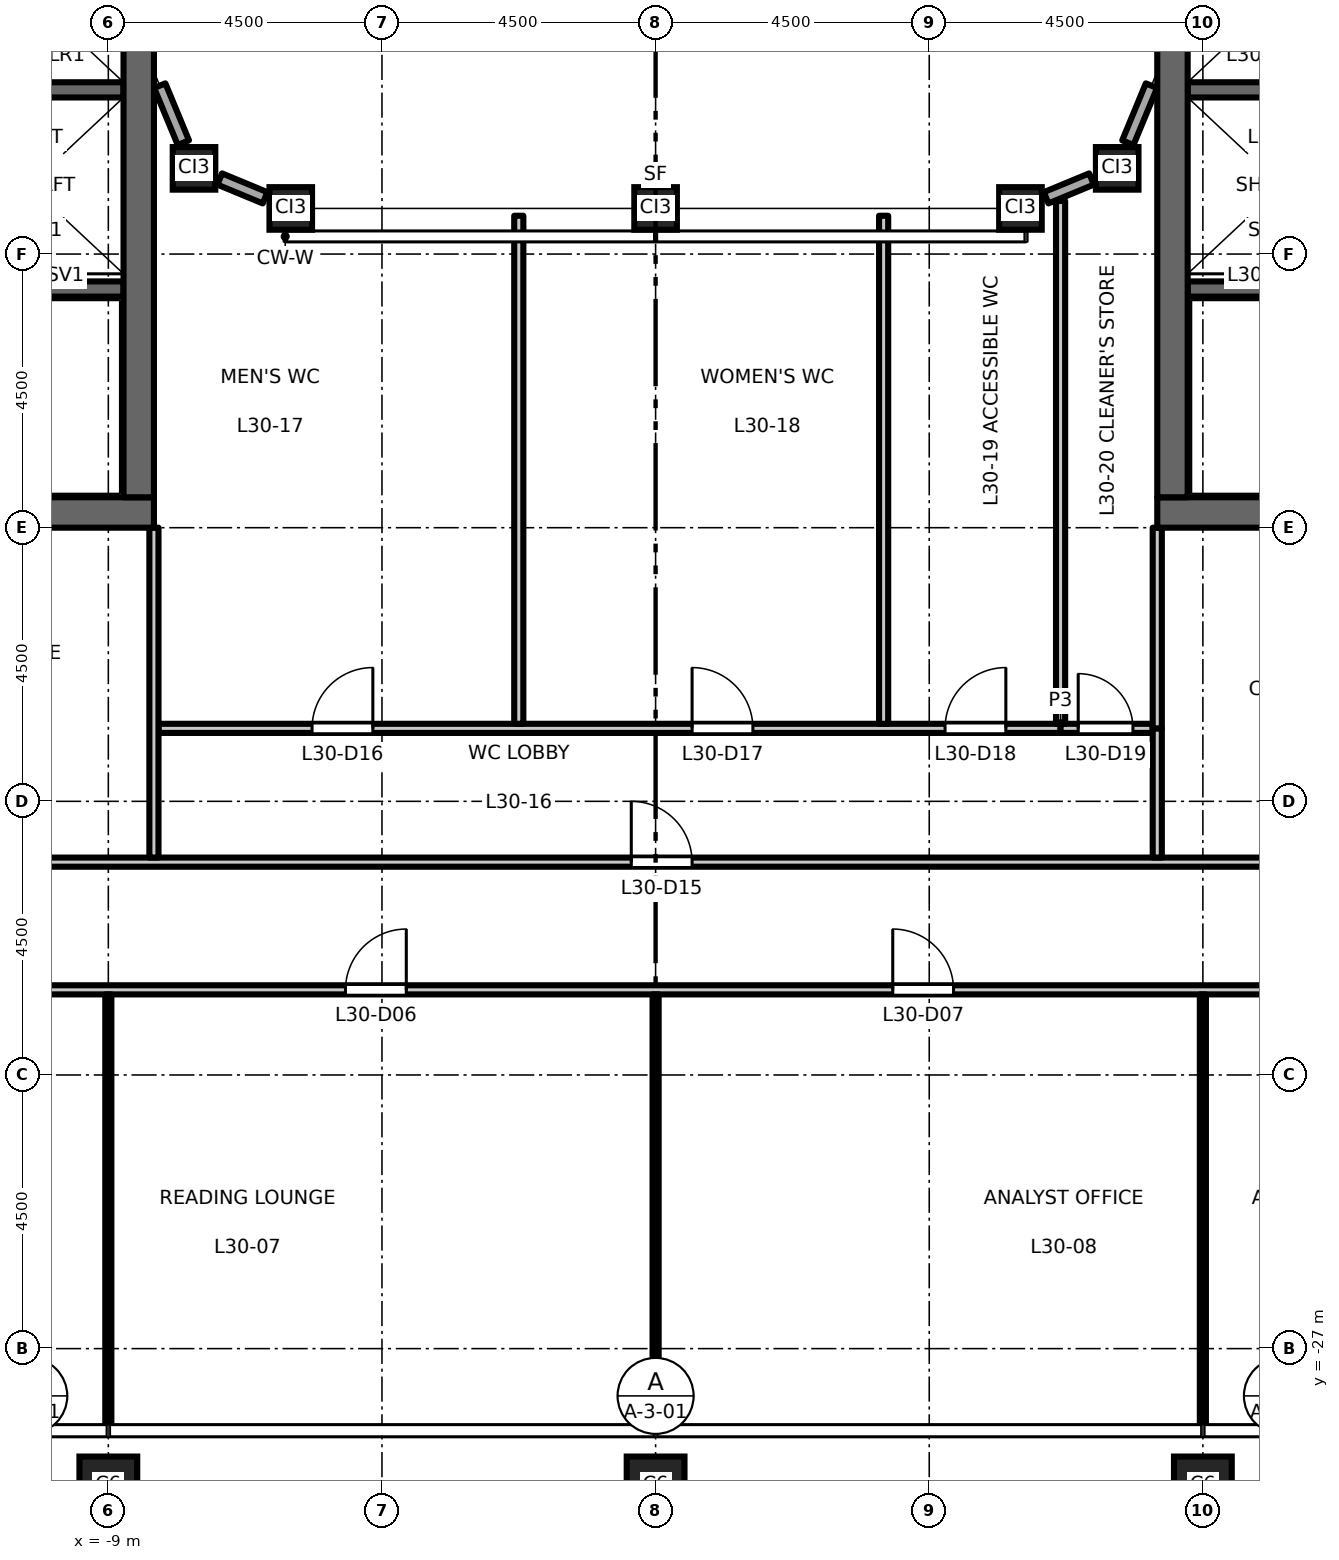
"""IFC4 building model, lengths in metres.
Left out: names, types, materials, properties, quantities, classifications, styles, units other than length and angle.
Written with IfcOpenShell. Run it as: python <this file> out.ifc"""

import sys

from ifc_helpers import new_model, si_unit, direction, frame, frame_2d, origin, origin_2d, place, context, subcontext, project, spatial, rectangle, hollow_rectangle, extrude, element, fill, save


model = new_model("IFC4")
c1 = context("Model", 3, precision=1e-05, world=origin(), true_north=direction((0.0, 1.0)))
c2 = subcontext(c1, "Body", "Model", "MODEL_VIEW")
j1 = project(units=[si_unit("LENGTHUNIT", "METRE"), si_unit("PLANEANGLEUNIT", "RADIAN")], contexts=[c1])
p1 = place(None, origin())
s1 = spatial("IfcSite", under=j1, at=p1, CompositionType="ELEMENT")
p2 = place(p1, origin())
s2 = spatial("IfcBuilding", under=s1, at=p2, CompositionType="ELEMENT")
p3 = place(p2, frame((0.0, 0.0, 140.7)))
s3 = spatial("IfcBuildingStorey", under=s2, at=p3, CompositionType="ELEMENT", Elevation=140.7)
for number, where, z_axis, x_axis in (
    (1, (-9.0, -29.25, 0.0), (0.0, 0.0, 1.0), (1.0, 0.0, 0.0)),
    (2, (0.0, -29.25, 0.0), (0.0, 0.0, 1.0), (1.0, 0.0, 0.0)),
    (3, (9.0, -29.25, 0.0), (0.0, 0.0, 1.0), (1.0, 0.0, 0.0)),
):
    element("IfcColumn", number, at=place(p3, frame(where, z_axis=z_axis, x_axis=x_axis)), inside=s3, PredefinedType="COLUMN", context=c2, shape_type="SweptSolid", body=[
        extrude(hollow_rectangle(XDim=0.95, YDim=0.95, WallThickness=0.055, at=origin_2d()), origin(), (0.0, 0.0, 1.0), 4.5),
    ])
for number, where, z_axis, x_axis in (
    (4, (-7.591, -7.591, 0.0), (0.0, 0.0, 1.0), (1.0, 0.0, 0.0)),
    (5, (-6.0, -8.25, 0.0), (0.0, 0.0, 1.0), (1.0, 0.0, 0.0)),
    (6, (0.0, -8.25, 0.0), (0.0, 0.0, 1.0), (1.0, 0.0, 0.0)),
    (7, (6.0, -8.25, 0.0), (0.0, 0.0, 1.0), (1.0, 0.0, 0.0)),
    (8, (7.591, -7.591, 0.0), (0.0, 0.0, 1.0), (1.0, 0.0, 0.0)),
):
    element("IfcColumn", number, at=place(p3, frame(where, z_axis=z_axis, x_axis=x_axis)), inside=s3, PredefinedType="COLUMN", context=c2, shape_type="SweptSolid", body=[
        extrude(hollow_rectangle(XDim=0.7, YDim=0.7, WallThickness=0.04, at=origin_2d()), origin(), (0.0, 0.0, 1.0), 4.5),
    ])
p4 = place(p3, frame((-8.75, -6.3, 0.0), z_axis=(0.0, 0.0, 1.0), x_axis=(-1.0, 0.0, 0.0)))
e9 = element("IfcWall", 9, at=p4, inside=s3, PredefinedType="SHEAR", context=c2, shape_type="SweptSolid", body=[
    extrude(rectangle(XDim=3.1, YDim=0.25, at=frame_2d((1.55, 0.0))), origin(), (0.0, 0.0, 1.0), 4.35),
])
p5 = place(p3, frame((-8.75, -9.575, 0.0), z_axis=(0.0, 0.0, 1.0), x_axis=(-1.0, 0.0, 0.0)))
e10 = element("IfcWall", 10, at=p5, inside=s3, PredefinedType="SHEAR", context=c2, shape_type="SweptSolid", body=[
    extrude(rectangle(XDim=8.0, YDim=0.25, at=frame_2d((4.0, 0.0))), origin(), (0.0, 0.0, 1.0), 4.35),
])
p6 = place(p5, frame((6.65, 0.0, 0.0)))
e11 = element("IfcOpeningElement", 11, at=p6, cuts=e10, PredefinedType="OPENING", context=c2, shape_type="SweptSolid", body=[
    extrude(rectangle(XDim=1.1, YDim=2.1, at=frame_2d((0.55, 1.05))), frame((0.0, 0.135, 0.0), z_axis=(0.0, -1.0, 0.0), x_axis=(1.0, 0.0, 0.0)), (0.0, 0.0, 1.0), 0.27),
])
p7 = place(p3, frame((-8.25, -13.25, 0.0), z_axis=(0.0, 0.0, 1.0), x_axis=(-1.0, 0.0, 0.0)))
e12 = element("IfcWall", 12, at=p7, inside=s3, PredefinedType="SHEAR", context=c2, shape_type="SweptSolid", body=[
    extrude(rectangle(XDim=13.5, YDim=0.5, at=frame_2d((6.75, 0.0))), origin(), (0.0, 0.0, 1.0), 4.35),
])
p8 = place(p3, frame((-8.5, -13.0, 0.0), z_axis=(0.0, 0.0, 1.0), x_axis=(0.0, 1.0, 0.0)))
e13 = element("IfcWall", 13, at=p8, inside=s3, PredefinedType="SHEAR", context=c2, shape_type="SweptSolid", body=[
    extrude(rectangle(XDim=26.0, YDim=0.5, at=frame_2d((13.0, 0.0))), origin(), (0.0, 0.0, 1.0), 4.35),
])
p9 = place(p3, frame((8.75, -6.3, 0.0), z_axis=(0.0, 0.0, 1.0), x_axis=(1.0, 0.0, 0.0)))
e14 = element("IfcWall", 14, at=p9, inside=s3, PredefinedType="SHEAR", context=c2, shape_type="SweptSolid", body=[
    extrude(rectangle(XDim=3.1, YDim=0.25, at=frame_2d((1.55, 0.0))), origin(), (0.0, 0.0, 1.0), 4.35),
])
p10 = place(p3, frame((8.75, -9.575, 0.0), z_axis=(0.0, 0.0, 1.0), x_axis=(1.0, 0.0, 0.0)))
e15 = element("IfcWall", 15, at=p10, inside=s3, PredefinedType="SHEAR", context=c2, shape_type="SweptSolid", body=[
    extrude(rectangle(XDim=8.0, YDim=0.25, at=frame_2d((4.0, 0.0))), origin(), (0.0, 0.0, 1.0), 4.35),
])
p11 = place(p10, frame((6.65, 0.0, 0.0)))
e16 = element("IfcOpeningElement", 16, at=p11, cuts=e15, PredefinedType="OPENING", context=c2, shape_type="SweptSolid", body=[
    extrude(rectangle(XDim=1.1, YDim=2.1, at=frame_2d((0.55, 1.05))), frame((0.0, 0.135, 0.0), z_axis=(0.0, -1.0, 0.0), x_axis=(1.0, 0.0, 0.0)), (0.0, 0.0, 1.0), 0.27),
])
p12 = place(p3, frame((8.25, -13.25, 0.0), z_axis=(0.0, 0.0, 1.0), x_axis=(1.0, 0.0, 0.0)))
e17 = element("IfcWall", 17, at=p12, inside=s3, PredefinedType="SHEAR", context=c2, shape_type="SweptSolid", body=[
    extrude(rectangle(XDim=13.5, YDim=0.5, at=frame_2d((6.75, 0.0))), origin(), (0.0, 0.0, 1.0), 4.35),
])
p13 = place(p3, frame((8.5, -13.0, 0.0), z_axis=(0.0, 0.0, 1.0), x_axis=(0.0, 1.0, 0.0)))
e18 = element("IfcWall", 18, at=p13, inside=s3, PredefinedType="SHEAR", context=c2, shape_type="SweptSolid", body=[
    extrude(rectangle(XDim=26.0, YDim=0.5, at=frame_2d((13.0, 0.0))), origin(), (0.0, 0.0, 1.0), 4.35),
])
p14 = place(p3, frame((6.423, -8.075, 0.0), z_axis=(0.0, 0.0, 1.0), x_axis=(0.923817771127, 0.382832503518, 0.0)))
e19 = element("IfcWall", 19, at=p14, inside=s3, PredefinedType="STANDARD", context=c2, shape_type="SweptSolid", body=[
    extrude(rectangle(XDim=0.807, YDim=0.2, at=frame_2d((0.404, 0.0))), origin(), (0.0, 0.0, 1.0), 3.826),
])
for number, where, z_axis, x_axis in (
    (20, (7.766, -7.168, 0.0), (0.0, 0.0, 1.0), (0.383, 0.924, 0.0)),
    (21, (-8.154, -6.231, 0.0), (0.0, 0.0, 1.0), (0.383, -0.924, 0.0)),
):
    element("IfcWall", number, at=place(p3, frame(where, z_axis=z_axis, x_axis=x_axis)), inside=s3, PredefinedType="STANDARD", context=c2, shape_type="SweptSolid", body=[
        extrude(rectangle(XDim=1.015, YDim=0.2, at=frame_2d((0.507, 0.0))), origin(), (0.0, 0.0, 1.0), 3.826),
    ])
p15 = place(p3, frame((-7.168, -7.766, 0.0), z_axis=(0.0, 0.0, 1.0), x_axis=(0.923817771127, -0.382832503518, 0.0)))
e22 = element("IfcWall", 22, at=p15, inside=s3, PredefinedType="STANDARD", context=c2, shape_type="SweptSolid", body=[
    extrude(rectangle(XDim=0.807, YDim=0.2, at=frame_2d((0.404, 0.0))), origin(), (0.0, 0.0, 1.0), 3.826),
])
p16 = place(p3, frame((-26.894, -21.1, 0.0), z_axis=(0.0, 0.0, 1.0), x_axis=(1.0, 0.0, 0.0)))
e23 = element("IfcWall", 23, at=p16, inside=s3, PredefinedType="PARTITIONING", context=c2, shape_type="SweptSolid", body=[
    extrude(rectangle(XDim=53.788, YDim=0.15, at=frame_2d((26.894, 0.0))), origin(), (0.0, 0.0, 1.0), 4.35),
])
p17 = place(p16, frame((12.794, 0.0, 0.0)))
e24 = element("IfcOpeningElement", 24, at=p17, cuts=e23, PredefinedType="OPENING", context=c2, shape_type="SweptSolid", body=[
    extrude(rectangle(XDim=1.0, YDim=2.1, at=frame_2d((0.5, 1.05))), frame((0.0, 0.085, 0.0), z_axis=(0.0, -1.0, 0.0), x_axis=(1.0, 0.0, 0.0)), (0.0, 0.0, 1.0), 0.17),
])
p18 = place(p16, frame((21.794, 0.0, 0.0)))
e25 = element("IfcOpeningElement", 25, at=p18, cuts=e23, PredefinedType="OPENING", context=c2, shape_type="SweptSolid", body=[
    extrude(rectangle(XDim=1.0, YDim=2.1, at=frame_2d((0.5, 1.05))), frame((0.0, 0.085, 0.0), z_axis=(0.0, -1.0, 0.0), x_axis=(1.0, 0.0, 0.0)), (0.0, 0.0, 1.0), 0.17),
])
p19 = place(p16, frame((30.794, 0.0, 0.0)))
e26 = element("IfcOpeningElement", 26, at=p19, cuts=e23, PredefinedType="OPENING", context=c2, shape_type="SweptSolid", body=[
    extrude(rectangle(XDim=1.0, YDim=2.1, at=frame_2d((0.5, 1.05))), frame((0.0, 0.085, 0.0), z_axis=(0.0, -1.0, 0.0), x_axis=(1.0, 0.0, 0.0)), (0.0, 0.0, 1.0), 0.17),
])
p20 = place(p16, frame((39.794, 0.0, 0.0)))
e27 = element("IfcOpeningElement", 27, at=p20, cuts=e23, PredefinedType="OPENING", context=c2, shape_type="SweptSolid", body=[
    extrude(rectangle(XDim=1.0, YDim=2.1, at=frame_2d((0.5, 1.05))), frame((0.0, 0.085, 0.0), z_axis=(0.0, -1.0, 0.0), x_axis=(1.0, 0.0, 0.0)), (0.0, 0.0, 1.0), 0.17),
])
p21 = place(p16, frame((3.9, 0.0, 0.0)))
e28 = element("IfcOpeningElement", 28, at=p21, cuts=e23, PredefinedType="OPENING", context=c2, shape_type="SweptSolid", body=[
    extrude(rectangle(XDim=1.0, YDim=2.1, at=frame_2d((0.5, 1.05))), frame((0.0, 0.085, 0.0), z_axis=(0.0, -1.0, 0.0), x_axis=(1.0, 0.0, 0.0)), (0.0, 0.0, 1.0), 0.17),
])
p22 = place(p16, frame((48.794, 0.0, 0.0)))
e29 = element("IfcOpeningElement", 29, at=p22, cuts=e23, PredefinedType="OPENING", context=c2, shape_type="SweptSolid", body=[
    extrude(rectangle(XDim=1.0, YDim=2.1, at=frame_2d((0.5, 1.05))), frame((0.0, 0.085, 0.0), z_axis=(0.0, -1.0, 0.0), x_axis=(1.0, 0.0, 0.0)), (0.0, 0.0, 1.0), 0.17),
])
p23 = place(p3, frame((-21.825, -19.0, 0.0), z_axis=(0.0, 0.0, 1.0), x_axis=(1.0, 0.0, 0.0)))
e30 = element("IfcWall", 30, at=p23, inside=s3, PredefinedType="PARTITIONING", context=c2, shape_type="SweptSolid", body=[
    extrude(rectangle(XDim=43.65, YDim=0.15, at=frame_2d((21.825, 0.0))), origin(), (0.0, 0.0, 1.0), 4.35),
])
p24 = place(p23, frame((21.425, 0.0, 0.0)))
e31 = element("IfcOpeningElement", 31, at=p24, cuts=e30, PredefinedType="OPENING", context=c2, shape_type="SweptSolid", body=[
    extrude(rectangle(XDim=1.0, YDim=2.1, at=frame_2d((0.5, 1.05))), frame((0.0, 0.085, 0.0), z_axis=(0.0, -1.0, 0.0), x_axis=(1.0, 0.0, 0.0)), (0.0, 0.0, 1.0), 0.17),
])
p25 = place(p23, frame((6.425, 0.0, 0.0)))
e32 = element("IfcOpeningElement", 32, at=p25, cuts=e30, PredefinedType="OPENING", context=c2, shape_type="SweptSolid", body=[
    extrude(rectangle(XDim=1.0, YDim=2.1, at=frame_2d((0.5, 1.05))), frame((0.0, 0.085, 0.0), z_axis=(0.0, -1.0, 0.0), x_axis=(1.0, 0.0, 0.0)), (0.0, 0.0, 1.0), 0.17),
])
p26 = place(p23, frame((36.425, 0.0, 0.0)))
e33 = element("IfcOpeningElement", 33, at=p26, cuts=e30, PredefinedType="OPENING", context=c2, shape_type="SweptSolid", body=[
    extrude(rectangle(XDim=1.0, YDim=2.1, at=frame_2d((0.5, 1.05))), frame((0.0, 0.085, 0.0), z_axis=(0.0, -1.0, 0.0), x_axis=(1.0, 0.0, 0.0)), (0.0, 0.0, 1.0), 0.17),
])
p27 = place(p3, frame((-8.175, -16.8, 0.0), z_axis=(0.0, 0.0, 1.0), x_axis=(1.0, 0.0, 0.0)))
e34 = element("IfcWall", 34, at=p27, inside=s3, PredefinedType="PARTITIONING", context=c2, shape_type="SweptSolid", body=[
    extrude(rectangle(XDim=14.835, YDim=0.15, at=frame_2d((7.417, 0.0))), origin(), (0.0, 0.0, 1.0), 4.35),
])
p28 = place(p27, frame((2.525, 0.0, 0.0)))
e35 = element("IfcOpeningElement", 35, at=p28, cuts=e34, PredefinedType="OPENING", context=c2, shape_type="SweptSolid", body=[
    extrude(rectangle(XDim=1.0, YDim=2.1, at=frame_2d((0.5, 1.05))), frame((0.0, 0.085, 0.0), z_axis=(0.0, -1.0, 0.0), x_axis=(1.0, 0.0, 0.0)), (0.0, 0.0, 1.0), 0.17),
])
p29 = place(p27, frame((8.775, 0.0, 0.0)))
e36 = element("IfcOpeningElement", 36, at=p29, cuts=e34, PredefinedType="OPENING", context=c2, shape_type="SweptSolid", body=[
    extrude(rectangle(XDim=1.0, YDim=2.1, at=frame_2d((0.5, 1.05))), frame((0.0, 0.085, 0.0), z_axis=(0.0, -1.0, 0.0), x_axis=(1.0, 0.0, 0.0)), (0.0, 0.0, 1.0), 0.17),
])
p30 = place(p27, frame((12.935, 0.0, 0.0)))
e37 = element("IfcOpeningElement", 37, at=p30, cuts=e34, PredefinedType="OPENING", context=c2, shape_type="SweptSolid", body=[
    extrude(rectangle(XDim=1.0, YDim=2.1, at=frame_2d((0.5, 1.05))), frame((0.0, 0.085, 0.0), z_axis=(0.0, -1.0, 0.0), x_axis=(1.0, 0.0, 0.0)), (0.0, 0.0, 1.0), 0.17),
])
p31 = place(p3, frame((6.66, -16.8, 0.0), z_axis=(0.0, 0.0, 1.0), x_axis=(1.0, 0.0, 0.0)))
e38 = element("IfcWall", 38, at=p31, inside=s3, PredefinedType="PARTITIONING", context=c2, shape_type="SweptSolid", body=[
    extrude(rectangle(XDim=1.515, YDim=0.15, at=frame_2d((0.758, 0.0))), origin(), (0.0, 0.0, 1.0), 4.35),
])
p32 = place(p31, frame((0.29, 0.0, 0.0)))
e39 = element("IfcOpeningElement", 39, at=p32, cuts=e38, PredefinedType="OPENING", context=c2, shape_type="SweptSolid", body=[
    extrude(rectangle(XDim=0.9, YDim=2.1, at=frame_2d((0.45, 1.05))), frame((0.0, 0.085, 0.0), z_axis=(0.0, -1.0, 0.0), x_axis=(1.0, 0.0, 0.0)), (0.0, 0.0, 1.0), 0.17),
])
p33 = place(p3, frame((-9.0, -28.26, 0.0), z_axis=(0.0, 0.0, 1.0), x_axis=(0.0, 1.0, 0.0)))
e40 = element("IfcWall", 40, at=p33, inside=s3, PredefinedType="PARTITIONING", context=c2, shape_type="SweptSolid", body=[
    extrude(rectangle(XDim=7.085, YDim=0.1, at=frame_2d((3.542, 0.0))), origin(), (0.0, 0.0, 1.0), 3.45),
])
p34 = place(p3, frame((-8.25, -18.925, 0.0), z_axis=(0.0, 0.0, 1.0), x_axis=(0.0, 1.0, 0.0)))
e41 = element("IfcWall", 41, at=p34, inside=s3, PredefinedType="PARTITIONING", context=c2, shape_type="SweptSolid", body=[
    extrude(rectangle(XDim=5.425, YDim=0.15, at=frame_2d((2.712, 0.0))), origin(), (0.0, 0.0, 1.0), 4.35),
])
p35 = place(p3, frame((-2.25, -16.725, 0.0), z_axis=(0.0, 0.0, 1.0), x_axis=(0.0, 1.0, 0.0)))
e42 = element("IfcWall", 42, at=p35, inside=s3, PredefinedType="PARTITIONING", context=c2, shape_type="SweptSolid", body=[
    extrude(rectangle(XDim=8.355, YDim=0.15, at=frame_2d((4.177, 0.0))), origin(), (0.0, 0.0, 1.0), 4.35),
])
p36 = place(p3, frame((0.0, -28.26, 0.0), z_axis=(0.0, 0.0, 1.0), x_axis=(0.0, 1.0, 0.0)))
e43 = element("IfcWall", 43, at=p36, inside=s3, PredefinedType="PARTITIONING", context=c2, shape_type="SweptSolid", body=[
    extrude(rectangle(XDim=7.085, YDim=0.1, at=frame_2d((3.542, 0.0))), origin(), (0.0, 0.0, 1.0), 3.45),
])
p37 = place(p3, frame((3.75, -16.725, 0.0), z_axis=(0.0, 0.0, 1.0), x_axis=(0.0, 1.0, 0.0)))
e44 = element("IfcWall", 44, at=p37, inside=s3, PredefinedType="PARTITIONING", context=c2, shape_type="SweptSolid", body=[
    extrude(rectangle(XDim=8.355, YDim=0.15, at=frame_2d((4.177, 0.0))), origin(), (0.0, 0.0, 1.0), 4.35),
])
p38 = place(p3, frame((6.66, -16.725, 0.0), z_axis=(0.0, 0.0, 1.0), x_axis=(0.0, 1.0, 0.0)))
e45 = element("IfcWall", 45, at=p38, inside=s3, PredefinedType="PARTITIONING", context=c2, shape_type="SweptSolid", body=[
    extrude(rectangle(XDim=8.598, YDim=0.15, at=frame_2d((4.299, 0.0))), origin(), (0.0, 0.0, 1.0), 4.35),
])
p39 = place(p3, frame((8.25, -18.925, 0.0), z_axis=(0.0, 0.0, 1.0), x_axis=(0.0, 1.0, 0.0)))
e46 = element("IfcWall", 46, at=p39, inside=s3, PredefinedType="PARTITIONING", context=c2, shape_type="SweptSolid", body=[
    extrude(rectangle(XDim=2.125, YDim=0.15, at=frame_2d((1.062, 0.0))), origin(), (0.0, 0.0, 1.0), 4.35),
])
p40 = place(p3, frame((8.25, -16.8, 0.0), z_axis=(0.0, 0.0, 1.0), x_axis=(0.0, 1.0, 0.0)))
e47 = element("IfcWall", 47, at=p40, inside=s3, PredefinedType="PARTITIONING", context=c2, shape_type="SweptSolid", body=[
    extrude(rectangle(XDim=3.3, YDim=0.15, at=frame_2d((1.65, 0.0))), origin(), (0.0, 0.0, 1.0), 4.35),
])
p41 = place(p3, frame((9.0, -28.26, 0.0), z_axis=(0.0, 0.0, 1.0), x_axis=(0.0, 1.0, 0.0)))
e48 = element("IfcWall", 48, at=p41, inside=s3, PredefinedType="PARTITIONING", context=c2, shape_type="SweptSolid", body=[
    extrude(rectangle(XDim=7.085, YDim=0.1, at=frame_2d((3.542, 0.0))), origin(), (0.0, 0.0, 1.0), 3.45),
])
p42 = place(p18, origin())
e49 = element("IfcDoor", 49, at=p42, inside=s3, OperationType="SINGLE_SWING_RIGHT", PredefinedType="DOOR", context=c2, shape_type="SweptSolid", body=[
    extrude(rectangle(XDim=1.0, YDim=2.1, at=frame_2d((0.5, 1.05))), frame((0.0, 0.025, 0.0), z_axis=(0.0, -1.0, 0.0), x_axis=(1.0, 0.0, 0.0)), (0.0, 0.0, 1.0), 0.05),
])
fill(e25, e49)
p43 = place(p19, origin())
e50 = element("IfcDoor", 50, at=p43, inside=s3, OperationType="SINGLE_SWING_LEFT", PredefinedType="DOOR", context=c2, shape_type="SweptSolid", body=[
    extrude(rectangle(XDim=1.0, YDim=2.1, at=frame_2d((0.5, 1.05))), frame((0.0, 0.025, 0.0), z_axis=(0.0, -1.0, 0.0), x_axis=(1.0, 0.0, 0.0)), (0.0, 0.0, 1.0), 0.05),
])
fill(e26, e50)
p44 = place(p24, origin())
e51 = element("IfcDoor", 51, at=p44, inside=s3, OperationType="SINGLE_SWING_LEFT", PredefinedType="DOOR", context=c2, shape_type="SweptSolid", body=[
    extrude(rectangle(XDim=1.0, YDim=2.1, at=frame_2d((0.5, 1.05))), frame((0.0, 0.025, 0.0), z_axis=(0.0, -1.0, 0.0), x_axis=(1.0, 0.0, 0.0)), (0.0, 0.0, 1.0), 0.05),
])
fill(e31, e51)
p45 = place(p28, origin())
e52 = element("IfcDoor", 52, at=p45, inside=s3, OperationType="SINGLE_SWING_RIGHT", PredefinedType="DOOR", context=c2, shape_type="SweptSolid", body=[
    extrude(rectangle(XDim=1.0, YDim=2.1, at=frame_2d((0.5, 1.05))), frame((0.0, 0.025, 0.0), z_axis=(0.0, -1.0, 0.0), x_axis=(1.0, 0.0, 0.0)), (0.0, 0.0, 1.0), 0.05),
])
fill(e35, e52)
p46 = place(p29, origin())
e53 = element("IfcDoor", 53, at=p46, inside=s3, OperationType="SINGLE_SWING_LEFT", PredefinedType="DOOR", context=c2, shape_type="SweptSolid", body=[
    extrude(rectangle(XDim=1.0, YDim=2.1, at=frame_2d((0.5, 1.05))), frame((0.0, 0.025, 0.0), z_axis=(0.0, -1.0, 0.0), x_axis=(1.0, 0.0, 0.0)), (0.0, 0.0, 1.0), 0.05),
])
fill(e36, e53)
p47 = place(p30, origin())
e54 = element("IfcDoor", 54, at=p47, inside=s3, OperationType="SINGLE_SWING_RIGHT", PredefinedType="DOOR", context=c2, shape_type="SweptSolid", body=[
    extrude(rectangle(XDim=1.0, YDim=2.1, at=frame_2d((0.5, 1.05))), frame((0.0, 0.025, 0.0), z_axis=(0.0, -1.0, 0.0), x_axis=(1.0, 0.0, 0.0)), (0.0, 0.0, 1.0), 0.05),
])
fill(e37, e54)
p48 = place(p32, origin())
e55 = element("IfcDoor", 55, at=p48, inside=s3, OperationType="SINGLE_SWING_LEFT", PredefinedType="DOOR", context=c2, shape_type="SweptSolid", body=[
    extrude(rectangle(XDim=0.9, YDim=2.1, at=frame_2d((0.45, 1.05))), frame((0.0, 0.025, 0.0), z_axis=(0.0, -1.0, 0.0), x_axis=(1.0, 0.0, 0.0)), (0.0, 0.0, 1.0), 0.05),
])
fill(e39, e55)
save(model, sys.argv[1])
